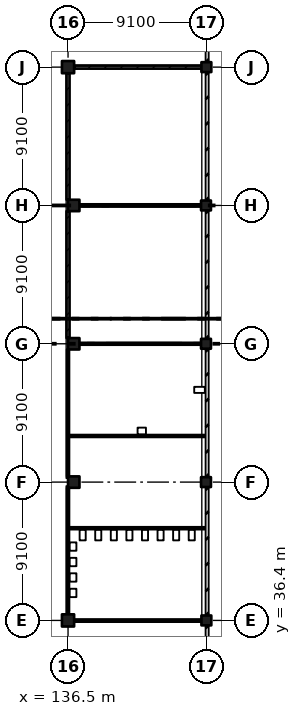
"""IFC4 building model, lengths in metres.
Left out: names, types, materials, properties, quantities, classifications, styles, units other than length and angle.
Written with IfcOpenShell. Run it as: python <this file> out.ifc"""

import sys

from ifc_helpers import new_model, si_unit, direction, frame, frame_2d, origin, origin_2d, place, context, subcontext, project, spatial, rectangle, extrude, element, fill, save


model = new_model("IFC4")
c1 = context("Model", 3, precision=1e-05, world=origin(), true_north=direction((0.0, 1.0)))
c2 = subcontext(c1, "Body", "Model", "MODEL_VIEW")
j1 = project(units=[si_unit("LENGTHUNIT", "METRE"), si_unit("PLANEANGLEUNIT", "RADIAN")], contexts=[c1])
p1 = place(None, origin())
s1 = spatial("IfcSite", under=j1, at=p1, CompositionType="ELEMENT")
p2 = place(p1, origin())
s2 = spatial("IfcBuilding", under=s1, at=p2, CompositionType="ELEMENT")
p3 = place(p2, frame((0.0, 0.0, 6.37)))
s3 = spatial("IfcBuildingStorey", under=s2, at=p3, CompositionType="ELEMENT", Elevation=6.37)
p4 = place(p3, frame((136.5, 36.4, 0.0), z_axis=(0.0, 0.0, 1.0), x_axis=(1.0, 0.0, 0.0)))
e1 = element("IfcColumn", 1, at=p4, inside=s3, PredefinedType="COLUMN", context=c2, shape_type="SweptSolid", body=[
    extrude(rectangle(XDim=0.8, YDim=0.8, at=origin_2d()), origin(), (0.0, 0.0, 1.0), 4.55),
])
for number, where, z_axis, x_axis in (
    (2, (136.875, 45.5, 0.0), (0.0, 0.0, 1.0), (1.0, 0.0, 0.0)),
    (3, (136.875, 54.6, 0.0), (0.0, 0.0, 1.0), (1.0, 0.0, 0.0)),
    (4, (136.875, 63.7, 0.0), (0.0, 0.0, 1.0), (1.0, 0.0, 0.0)),
):
    element("IfcColumn", number, at=place(p3, frame(where, z_axis=z_axis, x_axis=x_axis)), inside=s3, PredefinedType="COLUMN", context=c2, shape_type="SweptSolid", body=[
        extrude(rectangle(XDim=0.75, YDim=0.75, at=origin_2d()), origin(), (0.0, 0.0, 1.0), 4.55),
    ])
p5 = place(p3, frame((136.5, 72.8, 0.0), z_axis=(0.0, 0.0, 1.0), x_axis=(1.0, 0.0, 0.0)))
e5 = element("IfcColumn", 5, at=p5, inside=s3, PredefinedType="COLUMN", context=c2, shape_type="SweptSolid", body=[
    extrude(rectangle(XDim=0.8, YDim=0.8, at=origin_2d()), origin(), (0.0, 0.0, 1.0), 4.55),
])
for number, where, z_axis, x_axis in (
    (6, (145.6, 36.4, 0.0), (0.0, 0.0, 1.0), (1.0, 0.0, 0.0)),
    (7, (145.575, 45.5, 0.0), (0.0, 0.0, 1.0), (1.0, 0.0, 0.0)),
    (8, (145.575, 54.6, 0.0), (0.0, 0.0, 1.0), (1.0, 0.0, 0.0)),
    (9, (145.575, 63.7, 0.0), (0.0, 0.0, 1.0), (1.0, 0.0, 0.0)),
    (10, (145.6, 72.8, 0.0), (0.0, 0.0, 1.0), (1.0, 0.0, 0.0)),
):
    element("IfcColumn", number, at=place(p3, frame(where, z_axis=z_axis, x_axis=x_axis)), inside=s3, PredefinedType="COLUMN", context=c2, shape_type="SweptSolid", body=[
        extrude(rectangle(XDim=0.65, YDim=0.65, at=origin_2d()), origin(), (0.0, 0.0, 1.0), 4.55),
    ])
p6 = place(p3, frame((136.5, 36.8, 0.0), z_axis=(0.0, 0.0, 1.0), x_axis=(0.0, 1.0, 0.0)))
e11 = element("IfcWall", 11, at=p6, inside=s3, PredefinedType="PARTITIONING", context=c2, shape_type="SweptSolid", body=[
    extrude(rectangle(XDim=8.325, YDim=0.125, at=frame_2d((4.163, 0.0))), origin(), (0.0, 0.0, 1.0), 3.9),
])
p7 = place(p6, frame((6.575, 0.0, 0.0)))
e12 = element("IfcOpeningElement", 12, at=p7, cuts=e11, PredefinedType="OPENING", context=c2, shape_type="SweptSolid", body=[
    extrude(rectangle(XDim=0.9, YDim=2.1, at=frame_2d((0.45, 1.05))), frame((0.0, 0.073, 0.0), z_axis=(0.0, -1.0, 0.0), x_axis=(1.0, 0.0, 0.0)), (0.0, 0.0, 1.0), 0.145),
])
p8 = place(p3, frame((136.5, 45.875, 0.0), z_axis=(0.0, 0.0, 1.0), x_axis=(0.0, 1.0, 0.0)))
e13 = element("IfcWall", 13, at=p8, inside=s3, PredefinedType="PARTITIONING", context=c2, shape_type="SweptSolid", body=[
    extrude(rectangle(XDim=8.35, YDim=0.125, at=frame_2d((4.175, 0.0))), origin(), (0.0, 0.0, 1.0), 3.9),
])
p9 = place(p8, frame((5.0, 0.0, 0.0)))
e14 = element("IfcOpeningElement", 14, at=p9, cuts=e13, PredefinedType="OPENING", context=c2, shape_type="SweptSolid", body=[
    extrude(rectangle(XDim=1.0, YDim=2.1, at=frame_2d((0.5, 1.05))), frame((0.0, 0.073, 0.0), z_axis=(0.0, -1.0, 0.0), x_axis=(1.0, 0.0, 0.0)), (0.0, 0.0, 1.0), 0.145),
])
p10 = place(p3, frame((136.5, 63.325, 0.0), z_axis=(0.0, 0.0, 1.0), x_axis=(0.0, -1.0, 0.0)))
e15 = element("IfcWall", 15, at=p10, inside=s3, PredefinedType="PARTITIONING", context=c2, shape_type="SweptSolid", body=[
    extrude(rectangle(XDim=8.35, YDim=0.2, at=frame_2d((4.175, 0.0))), origin(), (0.0, 0.0, 1.0), 3.9),
])
p11 = place(p10, frame((3.65, 0.0, 0.0)))
e16 = element("IfcOpeningElement", 16, at=p11, cuts=e15, PredefinedType="OPENING", context=c2, shape_type="SweptSolid", body=[
    extrude(rectangle(XDim=1.0, YDim=2.1, at=frame_2d((0.5, 1.05))), frame((0.0, 0.11, 0.0), z_axis=(0.0, -1.0, 0.0), x_axis=(1.0, 0.0, 0.0)), (0.0, 0.0, 1.0), 0.22),
])
p12 = place(p3, frame((136.5, 72.4, 0.0), z_axis=(0.0, 0.0, 1.0), x_axis=(0.0, -1.0, 0.0)))
e17 = element("IfcWall", 17, at=p12, inside=s3, PredefinedType="PARTITIONING", context=c2, shape_type="SweptSolid", body=[
    extrude(rectangle(XDim=8.325, YDim=0.2, at=frame_2d((4.163, 0.0))), origin(), (0.0, 0.0, 1.0), 3.9),
])
for number, where, z_axis, x_axis in (
    (18, (136.562, 42.467, 0.0), (0.0, 0.0, 1.0), (1.0, 0.0, 0.0)),
    (19, (136.562, 48.533, 0.0), (0.0, 0.0, 1.0), (1.0, 0.0, 0.0)),
):
    element("IfcWall", number, at=place(p3, frame(where, z_axis=z_axis, x_axis=x_axis)), inside=s3, PredefinedType="PARTITIONING", context=c2, shape_type="SweptSolid", body=[
        extrude(rectangle(XDim=9.008, YDim=0.125, at=frame_2d((4.504, 0.0))), origin(), (0.0, 0.0, 1.0), 3.9),
    ])
p13 = place(p3, frame((136.9, 36.4, 0.0), z_axis=(0.0, 0.0, 1.0), x_axis=(1.0, 0.0, 0.0)))
e20 = element("IfcWall", 20, at=p13, inside=s3, PredefinedType="PARTITIONING", context=c2, shape_type="SweptSolid", body=[
    extrude(rectangle(XDim=8.375, YDim=0.125, at=frame_2d((4.188, 0.0))), origin(), (0.0, 0.0, 1.0), 3.9),
])
p14 = place(p13, frame((3.75, 0.0, 0.0)))
e21 = element("IfcOpeningElement", 21, at=p14, cuts=e20, PredefinedType="OPENING", context=c2, shape_type="SweptSolid", body=[
    extrude(rectangle(XDim=0.9, YDim=2.1, at=frame_2d((0.45, 1.05))), frame((0.0, 0.073, 0.0), z_axis=(0.0, -1.0, 0.0), x_axis=(1.0, 0.0, 0.0)), (0.0, 0.0, 1.0), 0.145),
])
p15 = place(p3, frame((137.25, 54.6, 0.0), z_axis=(0.0, 0.0, 1.0), x_axis=(1.0, 0.0, 0.0)))
e22 = element("IfcWall", 22, at=p15, inside=s3, PredefinedType="PARTITIONING", context=c2, shape_type="SweptSolid", body=[
    extrude(rectangle(XDim=8.0, YDim=0.125, at=frame_2d((4.0, 0.0))), origin(), (0.0, 0.0, 1.0), 3.9),
])
p16 = place(p3, frame((137.25, 63.7, 0.0), z_axis=(0.0, 0.0, 1.0), x_axis=(1.0, 0.0, 0.0)))
e23 = element("IfcWall", 23, at=p16, inside=s3, PredefinedType="PARTITIONING", context=c2, shape_type="SweptSolid", body=[
    extrude(rectangle(XDim=8.0, YDim=0.15, at=frame_2d((4.0, 0.0))), origin(), (0.0, 0.0, 1.0), 3.9),
])
p17 = place(p3, frame((145.275, 72.8, 0.0), z_axis=(0.0, 0.0, 1.0), x_axis=(-1.0, 0.0, 0.0)))
e24 = element("IfcWall", 24, at=p17, inside=s3, PredefinedType="PARTITIONING", context=c2, shape_type="SweptSolid", body=[
    extrude(rectangle(XDim=8.375, YDim=0.2, at=frame_2d((4.188, 0.0))), origin(), (0.0, 0.0, 1.0), 3.9),
])
p18 = place(p17, frame((3.25, 0.0, 0.0)))
e25 = element("IfcOpeningElement", 25, at=p18, cuts=e24, PredefinedType="OPENING", context=c2, shape_type="SweptSolid", body=[
    extrude(rectangle(XDim=1.8, YDim=2.1, at=frame_2d((0.9, 1.05))), frame((0.0, 0.11, 0.0), z_axis=(0.0, -1.0, 0.0), x_axis=(1.0, 0.0, 0.0)), (0.0, 0.0, 1.0), 0.22),
])
p19 = place(p14, origin())
e26 = element("IfcDoor", 26, at=p19, inside=s3, OperationType="SINGLE_SWING_LEFT", PredefinedType="DOOR", context=c2, shape_type="SweptSolid", body=[
    extrude(rectangle(XDim=0.9, YDim=2.1, at=frame_2d((0.45, 1.05))), frame((0.0, 0.025, 0.0), z_axis=(0.0, -1.0, 0.0), x_axis=(1.0, 0.0, 0.0)), (0.0, 0.0, 1.0), 0.05),
])
fill(e21, e26)
p20 = place(p7, origin())
e27 = element("IfcDoor", 27, at=p20, inside=s3, OperationType="SINGLE_SWING_RIGHT", PredefinedType="DOOR", context=c2, shape_type="SweptSolid", body=[
    extrude(rectangle(XDim=0.9, YDim=2.1, at=frame_2d((0.45, 1.05))), frame((0.0, 0.025, 0.0), z_axis=(0.0, -1.0, 0.0), x_axis=(1.0, 0.0, 0.0)), (0.0, 0.0, 1.0), 0.05),
])
fill(e12, e27)
p21 = place(p9, origin())
e28 = element("IfcDoor", 28, at=p21, inside=s3, OperationType="SINGLE_SWING_LEFT", PredefinedType="DOOR", context=c2, shape_type="SweptSolid", body=[
    extrude(rectangle(XDim=1.0, YDim=2.1, at=frame_2d((0.5, 1.05))), frame((0.0, 0.025, 0.0), z_axis=(0.0, -1.0, 0.0), x_axis=(1.0, 0.0, 0.0)), (0.0, 0.0, 1.0), 0.05),
])
fill(e14, e28)
p22 = place(p11, origin())
e29 = element("IfcDoor", 29, at=p22, inside=s3, OperationType="SINGLE_SWING_RIGHT", PredefinedType="DOOR", context=c2, shape_type="SweptSolid", body=[
    extrude(rectangle(XDim=1.0, YDim=2.1, at=frame_2d((0.5, 1.05))), frame((0.0, 0.025, 0.0), z_axis=(0.0, -1.0, 0.0), x_axis=(1.0, 0.0, 0.0)), (0.0, 0.0, 1.0), 0.05),
])
fill(e16, e29)
p23 = place(p18, origin())
e30 = element("IfcDoor", 30, at=p23, inside=s3, OperationType="DOUBLE_DOOR_SINGLE_SWING", PredefinedType="DOOR", context=c2, shape_type="SweptSolid", body=[
    extrude(rectangle(XDim=1.8, YDim=2.1, at=frame_2d((0.9, 1.05))), frame((0.0, 0.025, 0.0), z_axis=(0.0, -1.0, 0.0), x_axis=(1.0, 0.0, 0.0)), (0.0, 0.0, 1.0), 0.05),
])
fill(e25, e30)
save(model, sys.argv[1])
